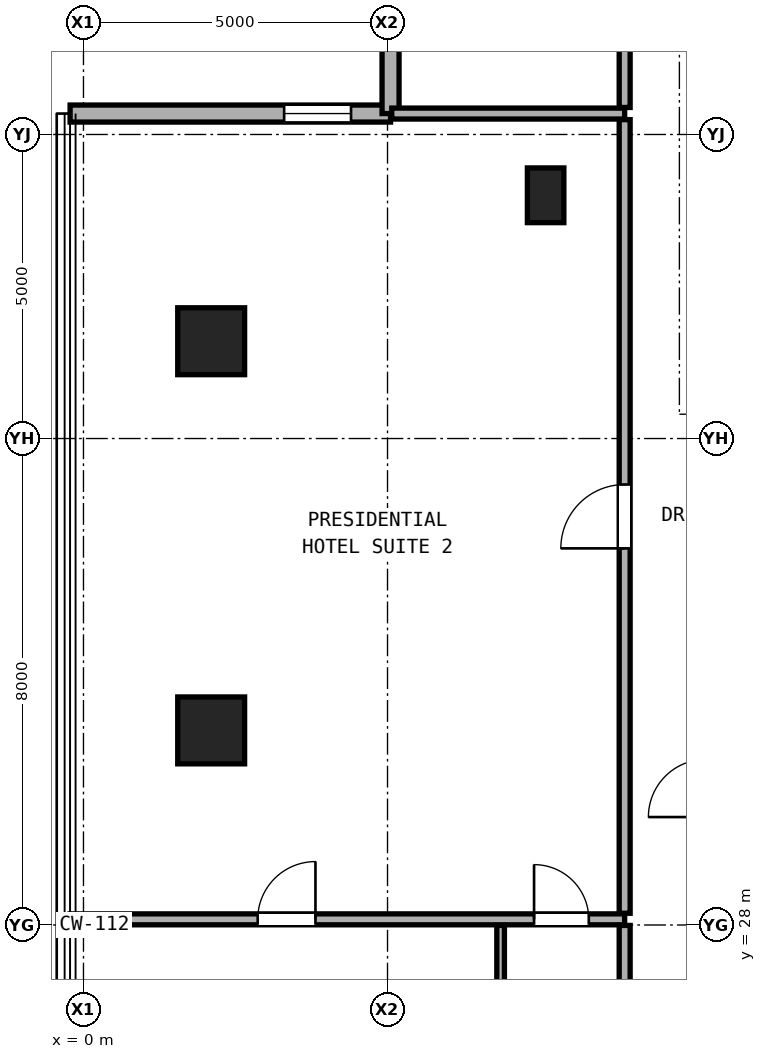
"""IFC4 building model, lengths in metres.
Left out: names, types, materials, properties, quantities, classifications, styles, units other than length and angle.
Written with IfcOpenShell. Run it as: python <this file> out.ifc"""

import sys

from ifc_helpers import new_model, si_unit, direction, frame, frame_2d, origin, origin_2d, place, context, subcontext, project, spatial, rectangle, hollow_rectangle, extrude, element, fill, save


model = new_model("IFC4")
c1 = context("Model", 3, precision=1e-05, world=origin(), true_north=direction((0.0, 1.0)))
c2 = subcontext(c1, "Body", "Model", "MODEL_VIEW")
j1 = project(units=[si_unit("LENGTHUNIT", "METRE"), si_unit("PLANEANGLEUNIT", "RADIAN")], contexts=[c1])
p1 = place(None, origin())
s1 = spatial("IfcSite", under=j1, at=p1, CompositionType="ELEMENT")
p2 = place(p1, origin())
s2 = spatial("IfcBuilding", under=s1, at=p2, CompositionType="ELEMENT")
p3 = place(p2, frame((0.0, 0.0, 128.0)))
s3 = spatial("IfcBuildingStorey", under=s2, at=p3, CompositionType="ELEMENT", Elevation=128.0)
for number, where, z_axis, x_axis in (
    (1, (2.1, 31.2, 0.0), (0.0, 0.0, 1.0), (1.0, 0.0, 0.0)),
    (2, (2.1, 37.6, 0.0), (0.0, 0.0, 1.0), (1.0, 0.0, 0.0)),
):
    element("IfcColumn", number, at=place(p3, frame(where, z_axis=z_axis, x_axis=x_axis)), inside=s3, PredefinedType="COLUMN", context=c2, shape_type="SweptSolid", body=[
        extrude(hollow_rectangle(XDim=1.1, YDim=1.1, WallThickness=0.06, at=origin_2d()), origin(), (0.0, 0.0, 1.0), 3.3),
    ])
p4 = place(p3, frame((7.6, 40.0, 0.0), z_axis=(0.0, 0.0, 1.0), x_axis=(1.0, 0.0, 0.0)))
e3 = element("IfcColumn", 3, at=p4, inside=s3, PredefinedType="PILASTER", context=c2, shape_type="SweptSolid", body=[
    extrude(rectangle(XDim=0.6, YDim=0.9, at=origin_2d()), origin(), (0.0, 0.0, 1.0), 3.3),
])
p5 = place(p3, frame((5.05, 41.344, 0.0), z_axis=(0.0, 0.0, 1.0), x_axis=(-1.0, 0.0, 0.0)))
e4 = element("IfcWall", 4, at=p5, inside=s3, PredefinedType="SOLIDWALL", context=c2, shape_type="SweptSolid", body=[
    extrude(rectangle(XDim=5.27, YDim=0.28, at=frame_2d((2.635, 0.0))), origin(), (0.0, 0.0, 1.0), 3.06),
])
p6 = place(p5, frame((0.65, 0.0, 0.85)))
e5 = element("IfcOpeningElement", 5, at=p6, cuts=e4, PredefinedType="OPENING", context=c2, shape_type="SweptSolid", body=[
    extrude(rectangle(XDim=1.1, YDim=2.0, at=frame_2d((0.55, 1.0))), frame((0.0, 0.15, 0.0), z_axis=(0.0, -1.0, 0.0), x_axis=(1.0, 0.0, 0.0)), (0.0, 0.0, 1.0), 0.3),
])
p7 = place(p3, frame((5.05, 46.614, 0.0), z_axis=(0.0, 0.0, 1.0), x_axis=(0.0, -1.0, 0.0)))
e6 = element("IfcWall", 6, at=p7, inside=s3, PredefinedType="SOLIDWALL", context=c2, shape_type="SweptSolid", body=[
    extrude(rectangle(XDim=5.27, YDim=0.28, at=frame_2d((2.635, 0.0))), origin(), (0.0, 0.0, 1.0), 3.06),
])
p8 = place(p3, frame((-0.22, 28.093, 0.0), z_axis=(0.0, 0.0, 1.0), x_axis=(1.0, 0.0, 0.0)))
e7 = element("IfcWall", 7, at=p8, inside=s3, PredefinedType="PARTITIONING", context=c2, shape_type="SweptSolid", body=[
    extrude(rectangle(XDim=9.12, YDim=0.18, at=frame_2d((4.56, 0.0))), origin(), (0.0, 0.0, 1.0), 2.299),
])
p9 = place(p8, frame((3.085, 0.0, 0.0)))
e8 = element("IfcOpeningElement", 8, at=p9, cuts=e7, PredefinedType="OPENING", context=c2, shape_type="SweptSolid", body=[
    extrude(rectangle(XDim=0.95, YDim=2.15, at=frame_2d((0.475, 1.075))), frame((0.0, 0.1, 0.0), z_axis=(0.0, -1.0, 0.0), x_axis=(1.0, 0.0, 0.0)), (0.0, 0.0, 1.0), 0.2),
])
p10 = place(p8, frame((7.63, 0.0, 0.0)))
e9 = element("IfcOpeningElement", 9, at=p10, cuts=e7, PredefinedType="OPENING", context=c2, shape_type="SweptSolid", body=[
    extrude(rectangle(XDim=0.9, YDim=2.1, at=frame_2d((0.45, 1.05))), frame((0.0, 0.1, 0.0), z_axis=(0.0, -1.0, 0.0), x_axis=(1.0, 0.0, 0.0)), (0.0, 0.0, 1.0), 0.2),
])
p11 = place(p3, frame((5.07, 41.344, 0.0), z_axis=(0.0, 0.0, 1.0), x_axis=(1.0, 0.0, 0.0)))
e10 = element("IfcWall", 10, at=p11, inside=s3, PredefinedType="PARTITIONING", context=c2, shape_type="SweptSolid", body=[
    extrude(rectangle(XDim=3.83, YDim=0.18, at=frame_2d((1.915, 0.0))), origin(), (0.0, 0.0, 1.0), 3.08),
])
p12 = place(p3, frame((6.86, 25.865, 0.0), z_axis=(0.0, 0.0, 1.0), x_axis=(0.0, 1.0, 0.0)))
e11 = element("IfcWall", 11, at=p12, inside=s3, PredefinedType="PARTITIONING", context=c2, shape_type="SweptSolid", body=[
    extrude(rectangle(XDim=2.127, YDim=0.125, at=frame_2d((1.064, 0.0))), origin(), (0.0, 0.0, 1.0), 3.08),
])
p13 = place(p3, frame((8.9, 25.865, 0.0), z_axis=(0.0, 0.0, 1.0), x_axis=(0.0, 1.0, 0.0)))
e12 = element("IfcWall", 12, at=p13, inside=s3, PredefinedType="PARTITIONING", context=c2, shape_type="SweptSolid", body=[
    extrude(rectangle(XDim=2.127, YDim=0.18, at=frame_2d((1.064, 0.0))), origin(), (0.0, 0.0, 1.0), 3.08),
])
p14 = place(p3, frame((8.9, 28.193, 0.0), z_axis=(0.0, 0.0, 1.0), x_axis=(0.0, 1.0, 0.0)))
e13 = element("IfcWall", 13, at=p14, inside=s3, PredefinedType="PARTITIONING", context=c2, shape_type="SweptSolid", body=[
    extrude(rectangle(XDim=13.051, YDim=0.18, at=frame_2d((6.525, 0.0))), origin(), (0.0, 0.0, 1.0), 2.299),
])
p15 = place(p14, frame((6.0, 0.0, 0.0)))
e14 = element("IfcOpeningElement", 14, at=p15, cuts=e13, PredefinedType="OPENING", context=c2, shape_type="SweptSolid", body=[
    extrude(rectangle(XDim=1.05, YDim=2.2, at=frame_2d((0.525, 1.1))), frame((0.0, 0.1, 0.0), z_axis=(0.0, -1.0, 0.0), x_axis=(1.0, 0.0, 0.0)), (0.0, 0.0, 1.0), 0.2),
])
p16 = place(p3, frame((8.9, 41.444, 0.0), z_axis=(0.0, 0.0, 1.0), x_axis=(0.0, 1.0, 0.0)))
e15 = element("IfcWall", 15, at=p16, inside=s3, PredefinedType="PARTITIONING", context=c2, shape_type="SweptSolid", body=[
    extrude(rectangle(XDim=5.17, YDim=0.18, at=frame_2d((2.585, 0.0))), origin(), (0.0, 0.0, 1.0), 3.08),
])
p17 = place(p16, frame((2.11, 0.0, 0.0)))
e16 = element("IfcOpeningElement", 16, at=p17, cuts=e15, PredefinedType="OPENING", context=c2, shape_type="SweptSolid", body=[
    extrude(rectangle(XDim=0.95, YDim=2.15, at=frame_2d((0.475, 1.075))), frame((0.0, 0.1, 0.0), z_axis=(0.0, -1.0, 0.0), x_axis=(1.0, 0.0, 0.0)), (0.0, 0.0, 1.0), 0.2),
])
p18 = place(p6, origin())
e17 = element("IfcWindow", 17, at=p18, inside=s3, PartitioningType="SINGLE_PANEL", PredefinedType="WINDOW", context=c2, shape_type="SweptSolid", body=[
    extrude(rectangle(XDim=1.1, YDim=2.0, at=frame_2d((0.55, 1.0))), frame((0.0, 0.03, 0.0), z_axis=(0.0, -1.0, 0.0), x_axis=(1.0, 0.0, 0.0)), (0.0, 0.0, 1.0), 0.06),
])
fill(e5, e17)
p19 = place(p15, origin())
e18 = element("IfcDoor", 18, at=p19, inside=s3, OperationType="SINGLE_SWING_LEFT", PredefinedType="DOOR", context=c2, shape_type="SweptSolid", body=[
    extrude(rectangle(XDim=1.05, YDim=2.2, at=frame_2d((0.525, 1.1))), frame((0.0, 0.025, 0.0), z_axis=(0.0, -1.0, 0.0), x_axis=(1.0, 0.0, 0.0)), (0.0, 0.0, 1.0), 0.05),
])
fill(e14, e18)
p20 = place(p9, origin())
e19 = element("IfcDoor", 19, at=p20, inside=s3, OperationType="SINGLE_SWING_RIGHT", PredefinedType="DOOR", context=c2, shape_type="SweptSolid", body=[
    extrude(rectangle(XDim=0.95, YDim=2.15, at=frame_2d((0.475, 1.075))), frame((0.0, 0.025, 0.0), z_axis=(0.0, -1.0, 0.0), x_axis=(1.0, 0.0, 0.0)), (0.0, 0.0, 1.0), 0.05),
])
fill(e8, e19)
p21 = place(p10, origin())
e20 = element("IfcDoor", 20, at=p21, inside=s3, OperationType="SINGLE_SWING_LEFT", PredefinedType="DOOR", context=c2, shape_type="SweptSolid", body=[
    extrude(rectangle(XDim=0.9, YDim=2.1, at=frame_2d((0.45, 1.05))), frame((0.0, 0.025, 0.0), z_axis=(0.0, -1.0, 0.0), x_axis=(1.0, 0.0, 0.0)), (0.0, 0.0, 1.0), 0.05),
])
fill(e9, e20)
save(model, sys.argv[1])
